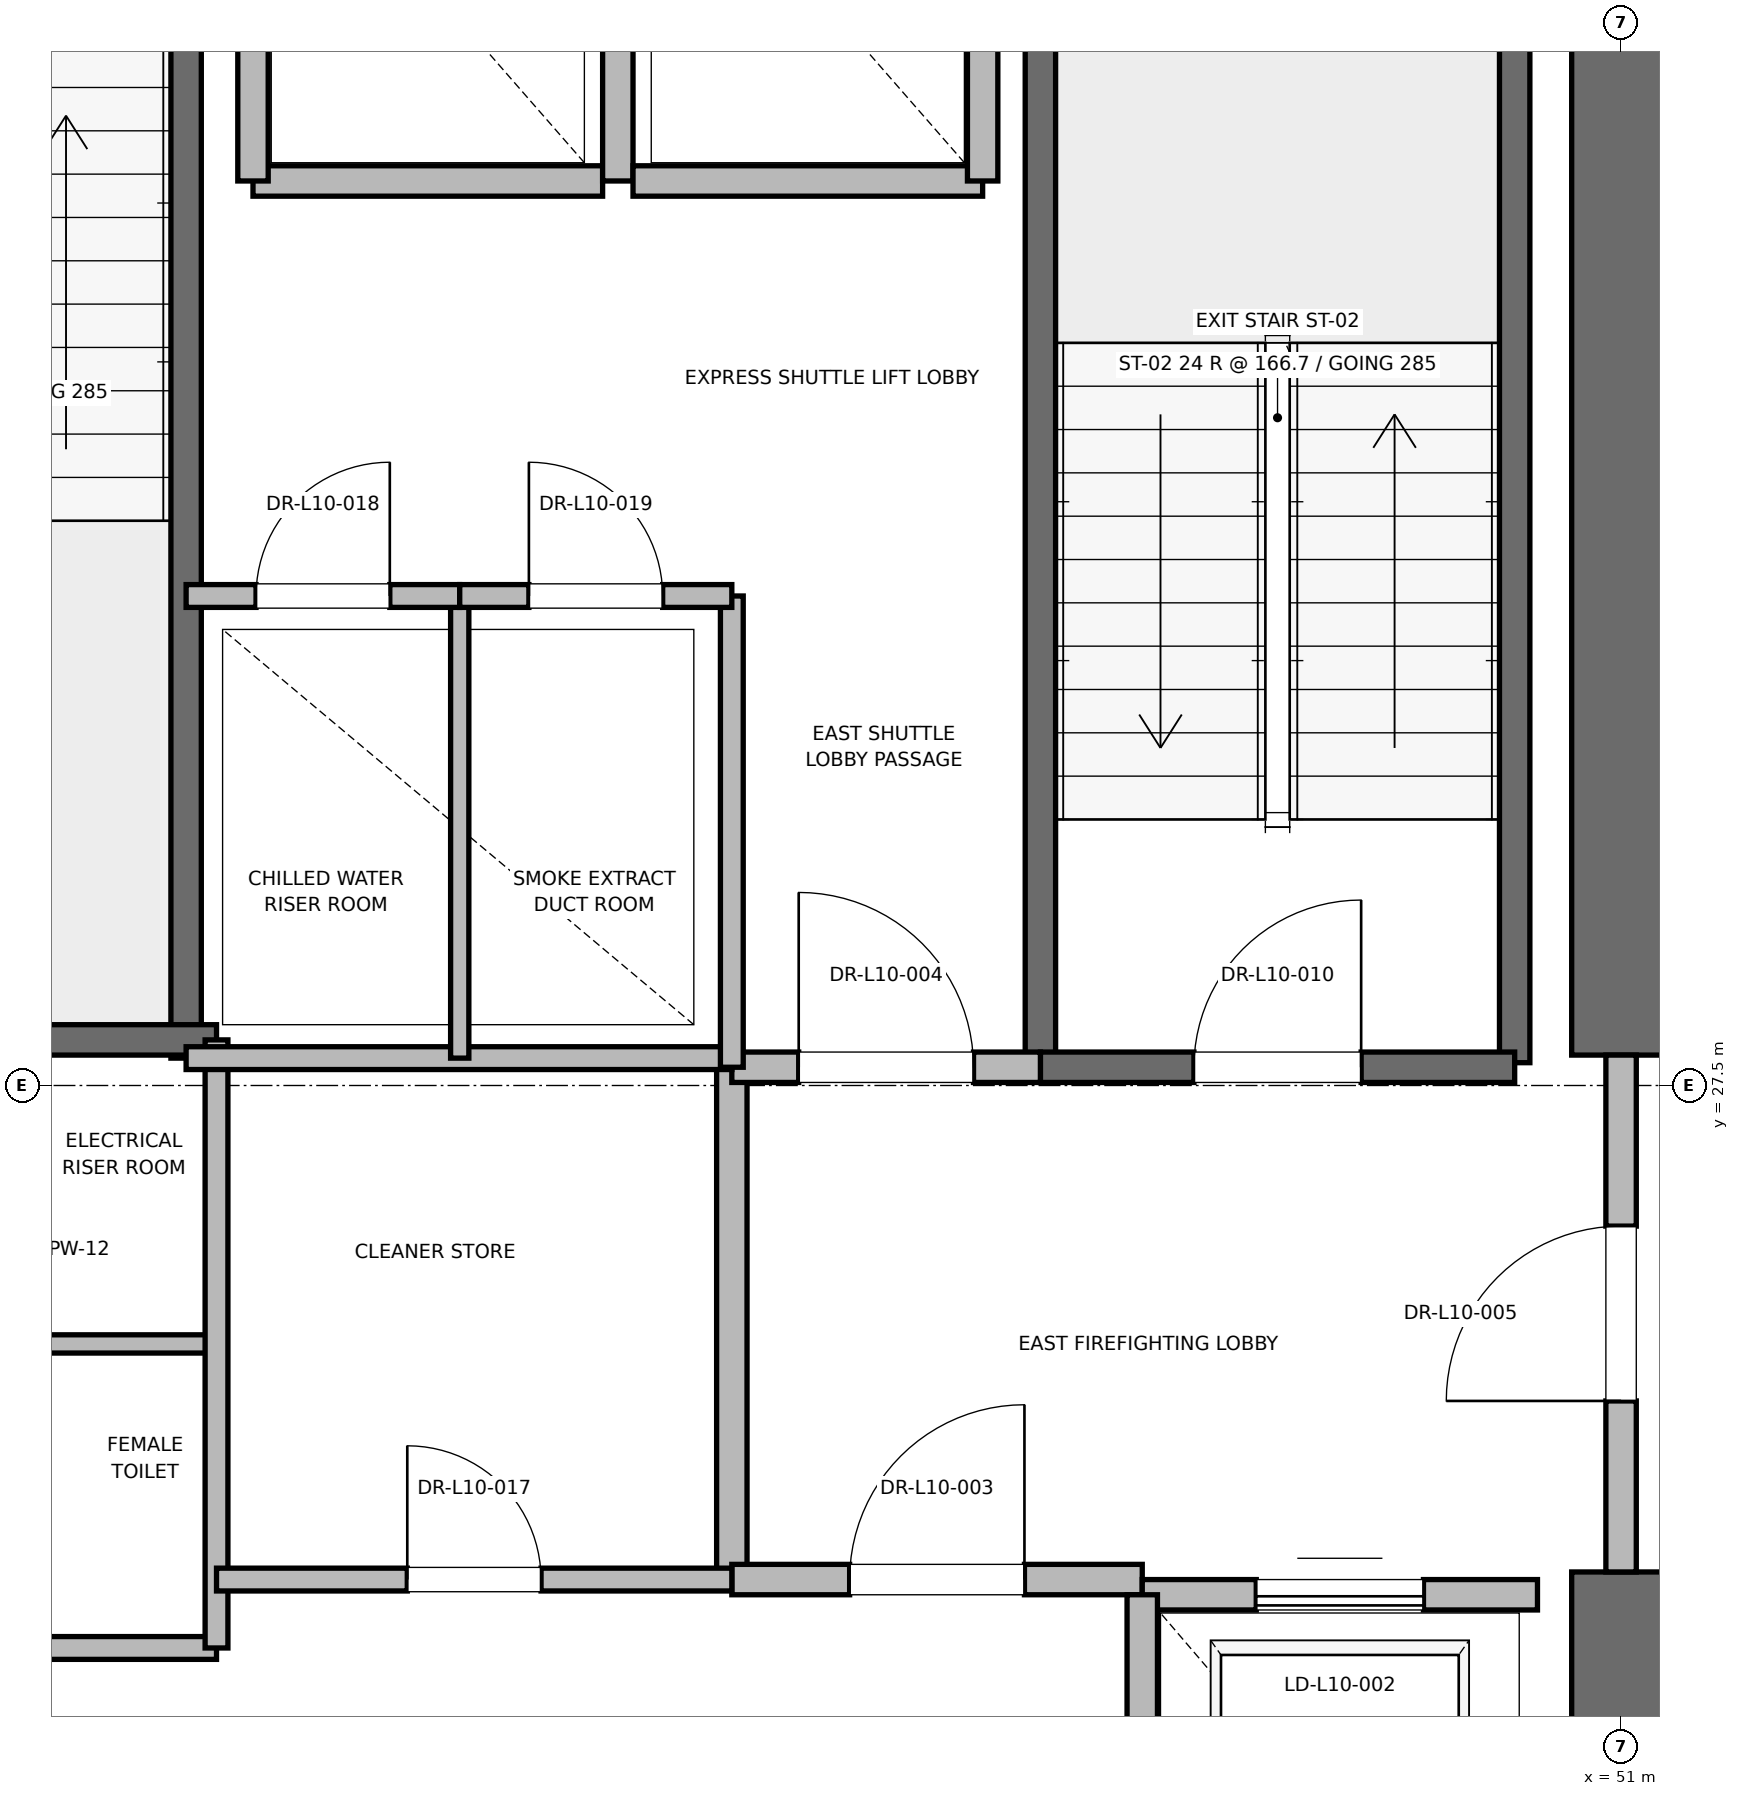
"""IFC4 building model, lengths in metres.
Left out: names, types, materials, properties, quantities, classifications, styles, units other than length and angle.
Written with IfcOpenShell. Run it as: python <this file> out.ifc"""

import sys

from ifc_helpers import new_model, si_unit, direction, frame, frame_2d, origin, place, context, subcontext, project, spatial, rectangle, extrude, element, fill, save


model = new_model("IFC4")
c1 = context("Model", 3, precision=1e-05, world=origin(), true_north=direction((0.0, 1.0)))
c2 = subcontext(c1, "Body", "Model", "MODEL_VIEW")
j1 = project(units=[si_unit("LENGTHUNIT", "METRE"), si_unit("PLANEANGLEUNIT", "RADIAN")], contexts=[c1])
p1 = place(None, origin())
s1 = spatial("IfcSite", under=j1, at=p1, CompositionType="ELEMENT")
p2 = place(p1, origin())
s2 = spatial("IfcBuilding", under=s1, at=p2, CompositionType="ELEMENT")
p3 = place(p2, frame((0.0, 0.0, 47.6)))
s3 = spatial("IfcBuildingStorey", under=s2, at=p3, CompositionType="ELEMENT", Elevation=47.6)
p4 = place(p3, frame((51.0, 18.5, 0.0), z_axis=(0.0, 0.0, 1.0), x_axis=(0.0, 1.0, 0.0)))
e1 = element("IfcWall", 1, at=p4, inside=s3, PredefinedType="SHEAR", context=c2, shape_type="SweptSolid", body=[
    extrude(rectangle(XDim=5.8, YDim=0.65, at=frame_2d((2.9, 0.0))), origin(), (0.0, 0.0, 1.0), 3.76),
])
p5 = place(p3, frame((51.0, 27.7, 0.0), z_axis=(0.0, 0.0, 1.0), x_axis=(0.0, 1.0, 0.0)))
e2 = element("IfcWall", 2, at=p5, inside=s3, PredefinedType="SHEAR", context=c2, shape_type="SweptSolid", body=[
    extrude(rectangle(XDim=8.8, YDim=0.65, at=frame_2d((4.4, 0.0))), origin(), (0.0, 0.0, 1.0), 3.76),
])
p6 = place(p3, frame((50.3, 27.65, 0.0), z_axis=(0.0, 0.0, 1.0), x_axis=(0.0, 1.0, 0.0)))
e3 = element("IfcWall", 3, at=p6, inside=s3, PredefinedType="SOLIDWALL", context=c2, shape_type="SweptSolid", body=[
    extrude(rectangle(XDim=8.15, YDim=0.2, at=frame_2d((4.075, 0.0))), origin(), (0.0, 0.0, 1.0), 3.76),
])
p7 = place(p3, frame((47.18, 27.62, 0.0), z_axis=(0.0, 0.0, 1.0), x_axis=(0.0, 1.0, 0.0)))
e4 = element("IfcWall", 4, at=p7, inside=s3, PredefinedType="SOLIDWALL", context=c2, shape_type="SweptSolid", body=[
    extrude(rectangle(XDim=8.18, YDim=0.2, at=frame_2d((4.09, 0.0))), origin(), (0.0, 0.0, 1.0), 3.76),
])
p8 = place(p3, frame((47.18, 27.62, 0.0), z_axis=(0.0, 0.0, 1.0), x_axis=(1.0, 0.0, 0.0)))
e5 = element("IfcWall", 5, at=p8, inside=s3, PredefinedType="SOLIDWALL", context=c2, shape_type="SweptSolid", body=[
    extrude(rectangle(XDim=3.12, YDim=0.2, at=frame_2d((1.56, 0.0))), origin(), (0.0, 0.0, 1.0), 3.76),
])
p9 = place(p8, frame((1.01, 0.0, 0.0)))
e6 = element("IfcOpeningElement", 6, at=p9, cuts=e5, PredefinedType="OPENING", context=c2, shape_type="SweptSolid", body=[
    extrude(rectangle(XDim=1.1, YDim=2.15, at=frame_2d((0.55, 1.075))), frame((0.0, 0.1, 0.0), z_axis=(0.0, -1.0, 0.0), x_axis=(1.0, 0.0, 0.0)), (0.0, 0.0, 1.0), 0.2),
])
p10 = place(p3, frame((41.56, 27.68, 0.0), z_axis=(0.0, 0.0, 1.0), x_axis=(0.0, 1.0, 0.0)))
e7 = element("IfcWall", 7, at=p10, inside=s3, PredefinedType="SOLIDWALL", context=c2, shape_type="SweptSolid", body=[
    extrude(rectangle(XDim=8.57, YDim=0.2, at=frame_2d((4.285, 0.0))), origin(), (0.0, 0.0, 1.0), 3.76),
])
p11 = place(p3, frame((38.44, 27.8, 0.0), z_axis=(0.0, 0.0, 1.0), x_axis=(1.0, 0.0, 0.0)))
e8 = element("IfcWall", 8, at=p11, inside=s3, PredefinedType="SOLIDWALL", context=c2, shape_type="SweptSolid", body=[
    extrude(rectangle(XDim=3.32, YDim=0.2, at=frame_2d((1.66, 0.0))), origin(), (0.0, 0.0, 1.0), 3.76),
])
p12 = place(p3, frame((45.15, 24.25, 0.0), z_axis=(0.0, 0.0, 1.0), x_axis=(0.0, 1.0, 0.0)))
e9 = element("IfcWall", 9, at=p12, inside=s3, PredefinedType="PARTITIONING", context=c2, shape_type="SweptSolid", body=[
    extrude(rectangle(XDim=3.37, YDim=0.2, at=frame_2d((1.685, 0.0))), origin(), (0.0, 0.0, 1.0), 3.76),
])
p13 = place(p3, frame((45.15, 24.25, 0.0), z_axis=(0.0, 0.0, 1.0), x_axis=(1.0, 0.0, 0.0)))
e10 = element("IfcWall", 10, at=p13, inside=s3, PredefinedType="PARTITIONING", context=c2, shape_type="SweptSolid", body=[
    extrude(rectangle(XDim=2.7, YDim=0.2, at=frame_2d((1.35, 0.0))), origin(), (0.0, 0.0, 1.0), 3.76),
])
p14 = place(p13, frame((0.775, 0.0, 0.0)))
e11 = element("IfcOpeningElement", 11, at=p14, cuts=e10, PredefinedType="OPENING", context=c2, shape_type="SweptSolid", body=[
    extrude(rectangle(XDim=1.15, YDim=2.2, at=frame_2d((0.575, 1.1))), frame((0.0, 0.1, 0.0), z_axis=(0.0, -1.0, 0.0), x_axis=(1.0, 0.0, 0.0)), (0.0, 0.0, 1.0), 0.2),
])
p15 = place(p3, frame((45.15, 27.62, 0.0), z_axis=(0.0, 0.0, 1.0), x_axis=(1.0, 0.0, 0.0)))
e12 = element("IfcWall", 12, at=p15, inside=s3, PredefinedType="PARTITIONING", context=c2, shape_type="SweptSolid", body=[
    extrude(rectangle(XDim=2.03, YDim=0.2, at=frame_2d((1.015, 0.0))), origin(), (0.0, 0.0, 1.0), 3.76),
])
p16 = place(p15, frame((0.44, 0.0, 0.0)))
e13 = element("IfcOpeningElement", 13, at=p16, cuts=e12, PredefinedType="OPENING", context=c2, shape_type="SweptSolid", body=[
    extrude(rectangle(XDim=1.15, YDim=2.2, at=frame_2d((0.575, 1.1))), frame((0.0, 0.1, 0.0), z_axis=(0.0, -1.0, 0.0), x_axis=(1.0, 0.0, 0.0)), (0.0, 0.0, 1.0), 0.2),
])
p17 = place(p3, frame((51.0, 24.3, 0.0), z_axis=(0.0, 0.0, 1.0), x_axis=(0.0, 1.0, 0.0)))
e14 = element("IfcWall", 14, at=p17, inside=s3, PredefinedType="PARTITIONING", context=c2, shape_type="SweptSolid", body=[
    extrude(rectangle(XDim=3.4, YDim=0.2, at=frame_2d((1.7, 0.0))), origin(), (0.0, 0.0, 1.0), 2.54),
])
p18 = place(p17, frame((1.125, 0.0, 0.0)))
e15 = element("IfcOpeningElement", 15, at=p18, cuts=e14, PredefinedType="OPENING", context=c2, shape_type="SweptSolid", body=[
    extrude(rectangle(XDim=1.15, YDim=2.2, at=frame_2d((0.575, 1.1))), frame((0.0, 0.1, 0.0), z_axis=(0.0, -1.0, 0.0), x_axis=(1.0, 0.0, 0.0)), (0.0, 0.0, 1.0), 0.2),
])
p19 = place(p3, frame((50.45, 24.15, 0.0), z_axis=(0.0, 0.0, 1.0), x_axis=(-1.0, 0.0, 0.0)))
e16 = element("IfcWall", 16, at=p19, inside=s3, PredefinedType="SOLIDWALL", context=c2, shape_type="SweptSolid", body=[
    extrude(rectangle(XDim=2.6, YDim=0.2, at=frame_2d((1.3, 0.0))), origin(), (0.0, 0.0, 1.0), 2.54),
])
p20 = place(p19, frame((0.75, 0.0, 0.0)))
e17 = element("IfcOpeningElement", 17, at=p20, cuts=e16, PredefinedType="OPENING", context=c2, shape_type="SweptSolid", body=[
    extrude(rectangle(XDim=1.1, YDim=2.2, at=frame_2d((0.55, 1.1))), frame((0.0, 0.1, 0.0), z_axis=(0.0, -1.0, 0.0), x_axis=(1.0, 0.0, 0.0)), (0.0, 0.0, 1.0), 0.2),
])
p21 = place(p3, frame((47.85, 24.15, 0.0), z_axis=(0.0, 0.0, 1.0), x_axis=(0.0, -1.0, 0.0)))
e18 = element("IfcWall", 18, at=p21, inside=s3, PredefinedType="SOLIDWALL", context=c2, shape_type="SweptSolid", body=[
    extrude(rectangle(XDim=3.0, YDim=0.2, at=frame_2d((1.5, 0.0))), origin(), (0.0, 0.0, 1.0), 3.76),
])
p22 = place(p3, frame((42.0, 33.45, 0.0), z_axis=(0.0, 0.0, 1.0), x_axis=(1.0, 0.0, 0.0)))
e19 = element("IfcWall", 19, at=p22, inside=s3, PredefinedType="SOLIDWALL", context=c2, shape_type="SweptSolid", body=[
    extrude(rectangle(XDim=2.3, YDim=0.2, at=frame_2d((1.15, 0.0))), origin(), (0.0, 0.0, 1.0), 3.76),
])
for number, where, z_axis, x_axis in (
    (20, (42.0, 36.05, 0.0), (0.0, 0.0, 1.0), (0.0, -1.0, 0.0)),
    (21, (44.4, 33.45, 0.0), (0.0, 0.0, 1.0), (0.0, 1.0, 0.0)),
):
    element("IfcWall", number, at=place(p3, frame(where, z_axis=z_axis, x_axis=x_axis)), inside=s3, PredefinedType="SOLIDWALL", context=c2, shape_type="SweptSolid", body=[
        extrude(rectangle(XDim=2.6, YDim=0.2, at=frame_2d((1.3, 0.0))), origin(), (0.0, 0.0, 1.0), 2.54),
    ])
p23 = place(p3, frame((44.5, 33.45, 0.0), z_axis=(0.0, 0.0, 1.0), x_axis=(1.0, 0.0, 0.0)))
e22 = element("IfcWall", 22, at=p23, inside=s3, PredefinedType="SOLIDWALL", context=c2, shape_type="SweptSolid", body=[
    extrude(rectangle(XDim=2.3, YDim=0.2, at=frame_2d((1.15, 0.0))), origin(), (0.0, 0.0, 1.0), 3.76),
])
p24 = place(p3, frame((46.8, 33.45, 0.0), z_axis=(0.0, 0.0, 1.0), x_axis=(0.0, 1.0, 0.0)))
e23 = element("IfcWall", 23, at=p24, inside=s3, PredefinedType="SOLIDWALL", context=c2, shape_type="SweptSolid", body=[
    extrude(rectangle(XDim=2.6, YDim=0.2, at=frame_2d((1.3, 0.0))), origin(), (0.0, 0.0, 1.0), 3.76),
])
p25 = place(p3, frame((39.95, 23.8, 0.0), z_axis=(0.0, 0.0, 1.0), x_axis=(1.0, 0.0, 0.0)))
e24 = element("IfcWall", 24, at=p25, inside=s3, PredefinedType="PARTITIONING", context=c2, shape_type="SweptSolid", body=[
    extrude(rectangle(XDim=1.81, YDim=0.15, at=frame_2d((0.905, 0.0))), origin(), (0.0, 0.0, 1.0), 2.85),
])
p26 = place(p3, frame((39.95, 25.8, 0.0), z_axis=(0.0, 0.0, 1.0), x_axis=(1.0, 0.0, 0.0)))
e25 = element("IfcWall", 25, at=p26, inside=s3, PredefinedType="PARTITIONING", context=c2, shape_type="SweptSolid", body=[
    extrude(rectangle(XDim=1.81, YDim=0.12, at=frame_2d((0.905, 0.0))), origin(), (0.0, 0.0, 1.0), 2.85),
])
p27 = place(p3, frame((41.76, 23.8, 0.0), z_axis=(0.0, 0.0, 1.0), x_axis=(0.0, 1.0, 0.0)))
e26 = element("IfcWall", 26, at=p27, inside=s3, PredefinedType="PARTITIONING", context=c2, shape_type="SweptSolid", body=[
    extrude(rectangle(XDim=4.0, YDim=0.15, at=frame_2d((2.0, 0.0))), origin(), (0.0, 0.0, 1.0), 2.85),
])
p28 = place(p3, frame((41.56, 27.68, 0.0), z_axis=(0.0, 0.0, 1.0), x_axis=(1.0, 0.0, 0.0)))
e27 = element("IfcWall", 27, at=p28, inside=s3, PredefinedType="PARTITIONING", context=c2, shape_type="SweptSolid", body=[
    extrude(rectangle(XDim=3.59, YDim=0.15, at=frame_2d((1.795, 0.0))), origin(), (0.0, 0.0, 1.0), 2.85),
])
p29 = place(p3, frame((41.76, 24.25, 0.0), z_axis=(0.0, 0.0, 1.0), x_axis=(1.0, 0.0, 0.0)))
e28 = element("IfcWall", 28, at=p29, inside=s3, PredefinedType="PARTITIONING", context=c2, shape_type="SweptSolid", body=[
    extrude(rectangle(XDim=3.39, YDim=0.15, at=frame_2d((1.695, 0.0))), origin(), (0.0, 0.0, 1.0), 2.85),
])
p30 = place(p29, frame((1.255, 0.0, 0.0)))
e29 = element("IfcOpeningElement", 29, at=p30, cuts=e28, PredefinedType="OPENING", context=c2, shape_type="SweptSolid", body=[
    extrude(rectangle(XDim=0.88, YDim=2.1, at=frame_2d((0.44, 1.05))), frame((0.0, 0.075, 0.0), z_axis=(0.0, -1.0, 0.0), x_axis=(1.0, 0.0, 0.0)), (0.0, 0.0, 1.0), 0.15),
])
p31 = place(p3, frame((45.15, 27.62, 0.0), z_axis=(0.0, 0.0, 1.0), x_axis=(0.0, 1.0, 0.0)))
e30 = element("IfcWall", 30, at=p31, inside=s3, PredefinedType="PARTITIONING", context=c2, shape_type="SweptSolid", body=[
    extrude(rectangle(XDim=3.1, YDim=0.15, at=frame_2d((1.55, 0.0))), origin(), (0.0, 0.0, 1.0), 2.85),
])
p32 = place(p3, frame((43.36, 27.68, 0.0), z_axis=(0.0, 0.0, 1.0), x_axis=(0.0, 1.0, 0.0)))
e31 = element("IfcWall", 31, at=p32, inside=s3, PredefinedType="PARTITIONING", context=c2, shape_type="SweptSolid", body=[
    extrude(rectangle(XDim=3.04, YDim=0.12, at=frame_2d((1.52, 0.0))), origin(), (0.0, 0.0, 1.0), 2.85),
])
p33 = place(p3, frame((41.56, 30.72, 0.0), z_axis=(0.0, 0.0, 1.0), x_axis=(1.0, 0.0, 0.0)))
e32 = element("IfcWall", 32, at=p33, inside=s3, PredefinedType="PARTITIONING", context=c2, shape_type="SweptSolid", body=[
    extrude(rectangle(XDim=1.8, YDim=0.15, at=frame_2d((0.9, 0.0))), origin(), (0.0, 0.0, 1.0), 2.85),
])
p34 = place(p33, frame((0.46, 0.0, 0.0)))
e33 = element("IfcOpeningElement", 33, at=p34, cuts=e32, PredefinedType="OPENING", context=c2, shape_type="SweptSolid", body=[
    extrude(rectangle(XDim=0.88, YDim=2.1, at=frame_2d((0.44, 1.05))), frame((0.0, 0.075, 0.0), z_axis=(0.0, -1.0, 0.0), x_axis=(1.0, 0.0, 0.0)), (0.0, 0.0, 1.0), 0.15),
])
p35 = place(p3, frame((43.36, 30.72, 0.0), z_axis=(0.0, 0.0, 1.0), x_axis=(1.0, 0.0, 0.0)))
e34 = element("IfcWall", 34, at=p35, inside=s3, PredefinedType="PARTITIONING", context=c2, shape_type="SweptSolid", body=[
    extrude(rectangle(XDim=1.79, YDim=0.15, at=frame_2d((0.895, 0.0))), origin(), (0.0, 0.0, 1.0), 2.85),
])
p36 = place(p35, frame((0.455, 0.0, 0.0)))
e35 = element("IfcOpeningElement", 35, at=p36, cuts=e34, PredefinedType="OPENING", context=c2, shape_type="SweptSolid", body=[
    extrude(rectangle(XDim=0.88, YDim=2.1, at=frame_2d((0.44, 1.05))), frame((0.0, 0.075, 0.0), z_axis=(0.0, -1.0, 0.0), x_axis=(1.0, 0.0, 0.0)), (0.0, 0.0, 1.0), 0.15),
])
p37 = place(p9, origin())
e36 = element("IfcDoor", 36, at=p37, inside=s3, OperationType="SINGLE_SWING_RIGHT", PredefinedType="DOOR", context=c2, shape_type="SweptSolid", body=[
    extrude(rectangle(XDim=1.1, YDim=2.15, at=frame_2d((0.55, 1.075))), frame((0.0, 0.025, 0.0), z_axis=(0.0, -1.0, 0.0), x_axis=(1.0, 0.0, 0.0)), (0.0, 0.0, 1.0), 0.05),
])
fill(e6, e36)
p38 = place(p14, origin())
e37 = element("IfcDoor", 37, at=p38, inside=s3, OperationType="SINGLE_SWING_RIGHT", PredefinedType="DOOR", context=c2, shape_type="SweptSolid", body=[
    extrude(rectangle(XDim=1.15, YDim=2.2, at=frame_2d((0.575, 1.1))), frame((0.0, 0.025, 0.0), z_axis=(0.0, -1.0, 0.0), x_axis=(1.0, 0.0, 0.0)), (0.0, 0.0, 1.0), 0.05),
])
fill(e11, e37)
p39 = place(p16, origin())
e38 = element("IfcDoor", 38, at=p39, inside=s3, OperationType="SINGLE_SWING_LEFT", PredefinedType="DOOR", context=c2, shape_type="SweptSolid", body=[
    extrude(rectangle(XDim=1.15, YDim=2.2, at=frame_2d((0.575, 1.1))), frame((0.0, 0.025, 0.0), z_axis=(0.0, -1.0, 0.0), x_axis=(1.0, 0.0, 0.0)), (0.0, 0.0, 1.0), 0.05),
])
fill(e13, e38)
p40 = place(p18, origin())
e39 = element("IfcDoor", 39, at=p40, inside=s3, OperationType="SINGLE_SWING_LEFT", PredefinedType="DOOR", context=c2, shape_type="SweptSolid", body=[
    extrude(rectangle(XDim=1.15, YDim=2.2, at=frame_2d((0.575, 1.1))), frame((0.0, 0.025, 0.0), z_axis=(0.0, -1.0, 0.0), x_axis=(1.0, 0.0, 0.0)), (0.0, 0.0, 1.0), 0.05),
])
fill(e15, e39)
p41 = place(p20, origin())
e40 = element("IfcDoor", 40, at=p41, inside=s3, OperationType="SLIDING_TO_RIGHT", PredefinedType="DOOR", context=c2, shape_type="SweptSolid", body=[
    extrude(rectangle(XDim=1.1, YDim=2.2, at=frame_2d((0.55, 1.1))), frame((0.0, 0.025, 0.0), z_axis=(0.0, -1.0, 0.0), x_axis=(1.0, 0.0, 0.0)), (0.0, 0.0, 1.0), 0.05),
])
fill(e17, e40)
p42 = place(p30, origin())
e41 = element("IfcDoor", 41, at=p42, inside=s3, OperationType="SINGLE_SWING_LEFT", PredefinedType="DOOR", context=c2, shape_type="SweptSolid", body=[
    extrude(rectangle(XDim=0.88, YDim=2.1, at=frame_2d((0.44, 1.05))), frame((0.0, 0.025, 0.0), z_axis=(0.0, -1.0, 0.0), x_axis=(1.0, 0.0, 0.0)), (0.0, 0.0, 1.0), 0.05),
])
fill(e29, e41)
p43 = place(p34, origin())
e42 = element("IfcDoor", 42, at=p43, inside=s3, OperationType="SINGLE_SWING_RIGHT", PredefinedType="DOOR", context=c2, shape_type="SweptSolid", body=[
    extrude(rectangle(XDim=0.88, YDim=2.1, at=frame_2d((0.44, 1.05))), frame((0.0, 0.025, 0.0), z_axis=(0.0, -1.0, 0.0), x_axis=(1.0, 0.0, 0.0)), (0.0, 0.0, 1.0), 0.05),
])
fill(e33, e42)
p44 = place(p36, origin())
e43 = element("IfcDoor", 43, at=p44, inside=s3, OperationType="SINGLE_SWING_LEFT", PredefinedType="DOOR", context=c2, shape_type="SweptSolid", body=[
    extrude(rectangle(XDim=0.88, YDim=2.1, at=frame_2d((0.44, 1.05))), frame((0.0, 0.025, 0.0), z_axis=(0.0, -1.0, 0.0), x_axis=(1.0, 0.0, 0.0)), (0.0, 0.0, 1.0), 0.05),
])
fill(e35, e43)
save(model, sys.argv[1])
